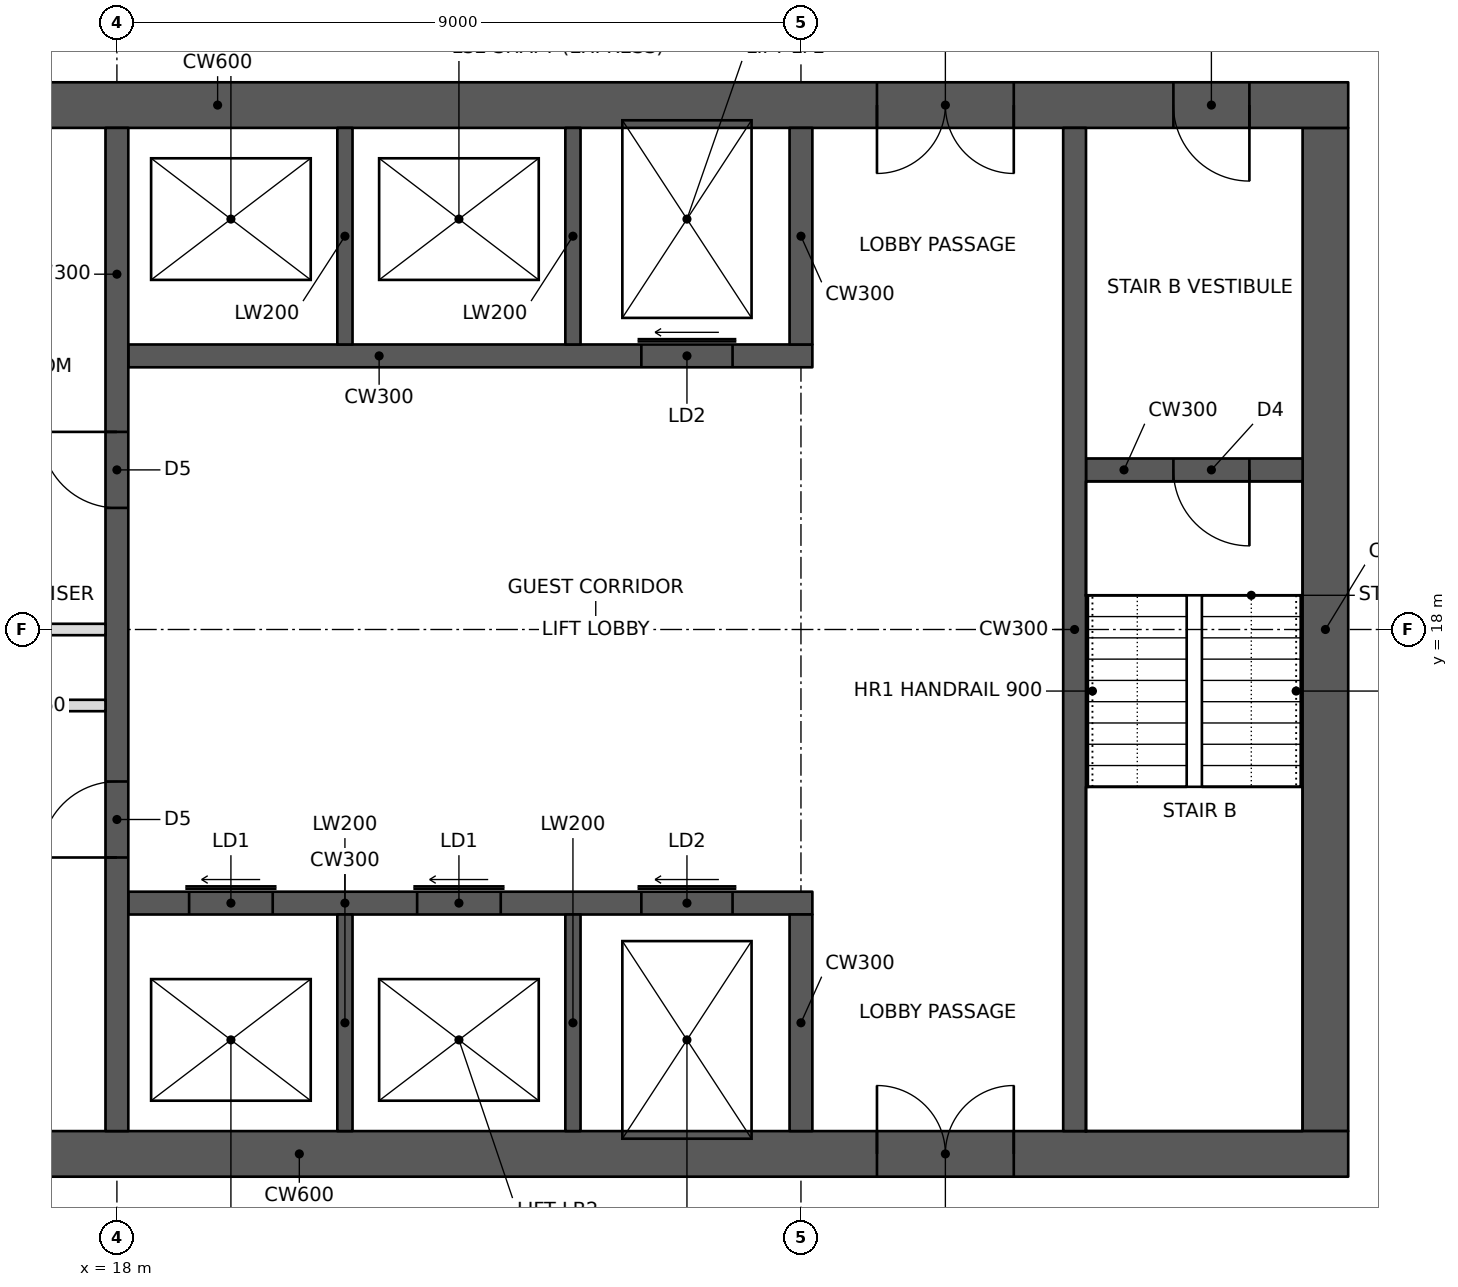
"""IFC4 building model, lengths in metres.
Left out: names, types, materials, properties, quantities, classifications, styles, units other than length and angle.
Written with IfcOpenShell. Run it as: python <this file> out.ifc"""

import sys

from ifc_helpers import new_model, si_unit, direction, frame, frame_2d, origin, place, context, subcontext, project, spatial, rectangle, extrude, element, fill, save


model = new_model("IFC4")
c1 = context("Model", 3, precision=1e-05, world=origin(), true_north=direction((0.0, 1.0)))
c2 = subcontext(c1, "Body", "Model", "MODEL_VIEW")
j1 = project(units=[si_unit("LENGTHUNIT", "METRE"), si_unit("PLANEANGLEUNIT", "RADIAN")], contexts=[c1])
p1 = place(None, origin())
s1 = spatial("IfcSite", under=j1, at=p1, CompositionType="ELEMENT")
p2 = place(p1, origin())
s2 = spatial("IfcBuilding", under=s1, at=p2, CompositionType="ELEMENT")
p3 = place(p2, frame((0.0, 0.0, 97.6)))
s3 = spatial("IfcBuildingStorey", under=s2, at=p3, CompositionType="ELEMENT", Elevation=97.6)
p4 = place(p3, frame((10.8, 11.1, 0.0), z_axis=(0.0, 0.0, 1.0), x_axis=(1.0, 0.0, 0.0)))
e1 = element("IfcWall", 1, at=p4, inside=s3, PredefinedType="SHEAR", context=c2, shape_type="SweptSolid", body=[
    extrude(rectangle(XDim=23.4, YDim=0.6, at=frame_2d((11.7, 0.0))), origin(), (0.0, 0.0, 1.0), 3.4),
])
p5 = place(p4, frame((1.0, 0.0, 0.0)))
e2 = element("IfcOpeningElement", 2, at=p5, cuts=e1, PredefinedType="OPENING", context=c2, shape_type="SweptSolid", body=[
    extrude(rectangle(XDim=1.0, YDim=2.1, at=frame_2d((0.5, 1.05))), frame((0.0, 0.31, 0.0), z_axis=(0.0, -1.0, 0.0), x_axis=(1.0, 0.0, 0.0)), (0.0, 0.0, 1.0), 0.62),
])
p6 = place(p4, frame((17.2, 0.0, 0.0)))
e3 = element("IfcOpeningElement", 3, at=p6, cuts=e1, PredefinedType="OPENING", context=c2, shape_type="SweptSolid", body=[
    extrude(rectangle(XDim=1.8, YDim=2.1, at=frame_2d((0.9, 1.05))), frame((0.0, 0.31, 0.0), z_axis=(0.0, -1.0, 0.0), x_axis=(1.0, 0.0, 0.0)), (0.0, 0.0, 1.0), 0.62),
])
p7 = place(p3, frame((10.8, 24.9, 0.0), z_axis=(0.0, 0.0, 1.0), x_axis=(1.0, 0.0, 0.0)))
e4 = element("IfcWall", 4, at=p7, inside=s3, PredefinedType="SHEAR", context=c2, shape_type="SweptSolid", body=[
    extrude(rectangle(XDim=23.4, YDim=0.6, at=frame_2d((11.7, 0.0))), origin(), (0.0, 0.0, 1.0), 3.4),
])
p8 = place(p7, frame((17.2, 0.0, 0.0)))
e5 = element("IfcOpeningElement", 5, at=p8, cuts=e4, PredefinedType="OPENING", context=c2, shape_type="SweptSolid", body=[
    extrude(rectangle(XDim=1.8, YDim=2.1, at=frame_2d((0.9, 1.05))), frame((0.0, 0.31, 0.0), z_axis=(0.0, -1.0, 0.0), x_axis=(1.0, 0.0, 0.0)), (0.0, 0.0, 1.0), 0.62),
])
p9 = place(p7, frame((21.1, 0.0, 0.0)))
e6 = element("IfcOpeningElement", 6, at=p9, cuts=e4, PredefinedType="OPENING", context=c2, shape_type="SweptSolid", body=[
    extrude(rectangle(XDim=1.0, YDim=2.1, at=frame_2d((0.5, 1.05))), frame((0.0, 0.31, 0.0), z_axis=(0.0, -1.0, 0.0), x_axis=(1.0, 0.0, 0.0)), (0.0, 0.0, 1.0), 0.62),
])
p10 = place(p3, frame((33.9, 11.4, 0.0), z_axis=(0.0, 0.0, 1.0), x_axis=(0.0, 1.0, 0.0)))
e7 = element("IfcWall", 7, at=p10, inside=s3, PredefinedType="SHEAR", context=c2, shape_type="SweptSolid", body=[
    extrude(rectangle(XDim=13.2, YDim=0.6, at=frame_2d((6.6, 0.0))), origin(), (0.0, 0.0, 1.0), 3.4),
])
p11 = place(p3, frame((18.0, 11.4, 0.0), z_axis=(0.0, 0.0, 1.0), x_axis=(0.0, 1.0, 0.0)))
e8 = element("IfcWall", 8, at=p11, inside=s3, PredefinedType="SHEAR", context=c2, shape_type="SweptSolid", body=[
    extrude(rectangle(XDim=13.2, YDim=0.3, at=frame_2d((6.6, 0.0))), origin(), (0.0, 0.0, 1.0), 3.4),
])
p12 = place(p11, frame((3.6, 0.0, 0.0)))
e9 = element("IfcOpeningElement", 9, at=p12, cuts=e8, PredefinedType="OPENING", context=c2, shape_type="SweptSolid", body=[
    extrude(rectangle(XDim=1.0, YDim=2.1, at=frame_2d((0.5, 1.05))), frame((0.0, 0.16, 0.0), z_axis=(0.0, -1.0, 0.0), x_axis=(1.0, 0.0, 0.0)), (0.0, 0.0, 1.0), 0.32),
])
p13 = place(p11, frame((8.2, 0.0, 0.0)))
e10 = element("IfcOpeningElement", 10, at=p13, cuts=e8, PredefinedType="OPENING", context=c2, shape_type="SweptSolid", body=[
    extrude(rectangle(XDim=1.0, YDim=2.1, at=frame_2d((0.5, 1.05))), frame((0.0, 0.16, 0.0), z_axis=(0.0, -1.0, 0.0), x_axis=(1.0, 0.0, 0.0)), (0.0, 0.0, 1.0), 0.32),
])
p14 = place(p3, frame((14.55, 18.0, 0.0), z_axis=(0.0, 0.0, 1.0), x_axis=(1.0, 0.0, 0.0)))
e11 = element("IfcWall", 11, at=p14, inside=s3, PredefinedType="PARTITIONING", context=c2, shape_type="SweptSolid", body=[
    extrude(rectangle(XDim=3.3, YDim=0.15, at=frame_2d((1.65, 0.0))), origin(), (0.0, 0.0, 1.0), 3.2),
])
p15 = place(p3, frame((18.15, 14.4, 0.0), z_axis=(0.0, 0.0, 1.0), x_axis=(1.0, 0.0, 0.0)))
e12 = element("IfcWall", 12, at=p15, inside=s3, PredefinedType="SHEAR", context=c2, shape_type="SweptSolid", body=[
    extrude(rectangle(XDim=9.0, YDim=0.3, at=frame_2d((4.5, 0.0))), origin(), (0.0, 0.0, 1.0), 3.4),
])
p16 = place(p15, frame((0.8, 0.0, 0.0)))
e13 = element("IfcOpeningElement", 13, at=p16, cuts=e12, PredefinedType="OPENING", context=c2, shape_type="SweptSolid", body=[
    extrude(rectangle(XDim=1.1, YDim=2.1, at=frame_2d((0.55, 1.05))), frame((0.0, 0.16, 0.0), z_axis=(0.0, -1.0, 0.0), x_axis=(1.0, 0.0, 0.0)), (0.0, 0.0, 1.0), 0.32),
])
p17 = place(p15, frame((3.8, 0.0, 0.0)))
e14 = element("IfcOpeningElement", 14, at=p17, cuts=e12, PredefinedType="OPENING", context=c2, shape_type="SweptSolid", body=[
    extrude(rectangle(XDim=1.1, YDim=2.1, at=frame_2d((0.55, 1.05))), frame((0.0, 0.16, 0.0), z_axis=(0.0, -1.0, 0.0), x_axis=(1.0, 0.0, 0.0)), (0.0, 0.0, 1.0), 0.32),
])
p18 = place(p15, frame((6.75, 0.0, 0.0)))
e15 = element("IfcOpeningElement", 15, at=p18, cuts=e12, PredefinedType="OPENING", context=c2, shape_type="SweptSolid", body=[
    extrude(rectangle(XDim=1.2, YDim=2.1, at=frame_2d((0.6, 1.05))), frame((0.0, 0.16, 0.0), z_axis=(0.0, -1.0, 0.0), x_axis=(1.0, 0.0, 0.0)), (0.0, 0.0, 1.0), 0.32),
])
p19 = place(p3, frame((27.0, 11.4, 0.0), z_axis=(0.0, 0.0, 1.0), x_axis=(0.0, 1.0, 0.0)))
e16 = element("IfcWall", 16, at=p19, inside=s3, PredefinedType="SHEAR", context=c2, shape_type="SweptSolid", body=[
    extrude(rectangle(XDim=2.85, YDim=0.3, at=frame_2d((1.425, 0.0))), origin(), (0.0, 0.0, 1.0), 3.4),
])
for number, where, z_axis, x_axis in (
    (17, (21.0, 11.4, 0.0), (0.0, 0.0, 1.0), (0.0, 1.0, 0.0)),
    (18, (24.0, 11.4, 0.0), (0.0, 0.0, 1.0), (0.0, 1.0, 0.0)),
):
    element("IfcWall", number, at=place(p3, frame(where, z_axis=z_axis, x_axis=x_axis)), inside=s3, PredefinedType="SHEAR", context=c2, shape_type="SweptSolid", body=[
        extrude(rectangle(XDim=2.85, YDim=0.2, at=frame_2d((1.425, 0.0))), origin(), (0.0, 0.0, 1.0), 3.4),
    ])
p20 = place(p3, frame((18.15, 21.6, 0.0), z_axis=(0.0, 0.0, 1.0), x_axis=(1.0, 0.0, 0.0)))
e19 = element("IfcWall", 19, at=p20, inside=s3, PredefinedType="SHEAR", context=c2, shape_type="SweptSolid", body=[
    extrude(rectangle(XDim=9.0, YDim=0.3, at=frame_2d((4.5, 0.0))), origin(), (0.0, 0.0, 1.0), 3.4),
])
p21 = place(p20, frame((6.75, 0.0, 0.0)))
e20 = element("IfcOpeningElement", 20, at=p21, cuts=e19, PredefinedType="OPENING", context=c2, shape_type="SweptSolid", body=[
    extrude(rectangle(XDim=1.2, YDim=2.1, at=frame_2d((0.6, 1.05))), frame((0.0, 0.16, 0.0), z_axis=(0.0, -1.0, 0.0), x_axis=(1.0, 0.0, 0.0)), (0.0, 0.0, 1.0), 0.32),
])
p22 = place(p3, frame((27.0, 21.75, 0.0), z_axis=(0.0, 0.0, 1.0), x_axis=(0.0, 1.0, 0.0)))
e21 = element("IfcWall", 21, at=p22, inside=s3, PredefinedType="SHEAR", context=c2, shape_type="SweptSolid", body=[
    extrude(rectangle(XDim=2.85, YDim=0.3, at=frame_2d((1.425, 0.0))), origin(), (0.0, 0.0, 1.0), 3.4),
])
for number, where, z_axis, x_axis in (
    (22, (21.0, 21.75, 0.0), (0.0, 0.0, 1.0), (0.0, 1.0, 0.0)),
    (23, (24.0, 21.75, 0.0), (0.0, 0.0, 1.0), (0.0, 1.0, 0.0)),
):
    element("IfcWall", number, at=place(p3, frame(where, z_axis=z_axis, x_axis=x_axis)), inside=s3, PredefinedType="SHEAR", context=c2, shape_type="SweptSolid", body=[
        extrude(rectangle(XDim=2.85, YDim=0.2, at=frame_2d((1.425, 0.0))), origin(), (0.0, 0.0, 1.0), 3.4),
    ])
p23 = place(p3, frame((30.6, 11.4, 0.0), z_axis=(0.0, 0.0, 1.0), x_axis=(0.0, 1.0, 0.0)))
e24 = element("IfcWall", 24, at=p23, inside=s3, PredefinedType="SHEAR", context=c2, shape_type="SweptSolid", body=[
    extrude(rectangle(XDim=13.2, YDim=0.3, at=frame_2d((6.6, 0.0))), origin(), (0.0, 0.0, 1.0), 3.4),
])
p24 = place(p3, frame((30.75, 20.1, 0.0), z_axis=(0.0, 0.0, 1.0), x_axis=(1.0, 0.0, 0.0)))
e25 = element("IfcWall", 25, at=p24, inside=s3, PredefinedType="SHEAR", context=c2, shape_type="SweptSolid", body=[
    extrude(rectangle(XDim=2.85, YDim=0.3, at=frame_2d((1.425, 0.0))), origin(), (0.0, 0.0, 1.0), 3.4),
])
p25 = place(p24, frame((1.15, 0.0, 0.0)))
e26 = element("IfcOpeningElement", 26, at=p25, cuts=e25, PredefinedType="OPENING", context=c2, shape_type="SweptSolid", body=[
    extrude(rectangle(XDim=1.0, YDim=2.1, at=frame_2d((0.5, 1.05))), frame((0.0, 0.16, 0.0), z_axis=(0.0, -1.0, 0.0), x_axis=(1.0, 0.0, 0.0)), (0.0, 0.0, 1.0), 0.32),
])
p26 = place(p3, frame((14.55, 17.0, 0.0), z_axis=(0.0, 0.0, 1.0), x_axis=(1.0, 0.0, 0.0)))
e27 = element("IfcWall", 27, at=p26, inside=s3, PredefinedType="PARTITIONING", context=c2, shape_type="SweptSolid", body=[
    extrude(rectangle(XDim=3.3, YDim=0.15, at=frame_2d((1.65, 0.0))), origin(), (0.0, 0.0, 1.0), 3.2),
])
p27 = place(p26, frame((0.3, 0.0, 0.0)))
e28 = element("IfcOpeningElement", 28, at=p27, cuts=e27, PredefinedType="OPENING", context=c2, shape_type="SweptSolid", body=[
    extrude(rectangle(XDim=1.0, YDim=2.1, at=frame_2d((0.5, 1.05))), frame((0.0, 0.085, 0.0), z_axis=(0.0, -1.0, 0.0), x_axis=(1.0, 0.0, 0.0)), (0.0, 0.0, 1.0), 0.17),
])
p28 = place(p6, origin())
e29 = element("IfcDoor", 29, at=p28, inside=s3, OperationType="DOUBLE_DOOR_SINGLE_SWING", PredefinedType="DOOR", context=c2, shape_type="SweptSolid", body=[
    extrude(rectangle(XDim=1.8, YDim=2.1, at=frame_2d((0.9, 1.05))), frame((0.0, 0.025, 0.0), z_axis=(0.0, -1.0, 0.0), x_axis=(1.0, 0.0, 0.0)), (0.0, 0.0, 1.0), 0.05),
])
fill(e3, e29)
p29 = place(p8, frame((1.8, 0.0, 0.0), z_axis=(0.0, 0.0, 1.0), x_axis=(-1.0, 0.0, 0.0)))
e30 = element("IfcDoor", 30, at=p29, inside=s3, OperationType="DOUBLE_DOOR_SINGLE_SWING", PredefinedType="DOOR", context=c2, shape_type="SweptSolid", body=[
    extrude(rectangle(XDim=1.8, YDim=2.1, at=frame_2d((0.9, 1.05))), frame((0.0, 0.025, 0.0), z_axis=(0.0, -1.0, 0.0), x_axis=(1.0, 0.0, 0.0)), (0.0, 0.0, 1.0), 0.05),
])
fill(e5, e30)
p30 = place(p9, frame((1.0, 0.0, 0.0), z_axis=(0.0, 0.0, 1.0), x_axis=(-1.0, 0.0, 0.0)))
e31 = element("IfcDoor", 31, at=p30, inside=s3, OperationType="SINGLE_SWING_LEFT", PredefinedType="DOOR", context=c2, shape_type="SweptSolid", body=[
    extrude(rectangle(XDim=1.0, YDim=2.1, at=frame_2d((0.5, 1.05))), frame((0.0, 0.025, 0.0), z_axis=(0.0, -1.0, 0.0), x_axis=(1.0, 0.0, 0.0)), (0.0, 0.0, 1.0), 0.05),
])
fill(e6, e31)
p31 = place(p25, frame((1.0, 0.0, 0.0), z_axis=(0.0, 0.0, 1.0), x_axis=(-1.0, 0.0, 0.0)))
e32 = element("IfcDoor", 32, at=p31, inside=s3, OperationType="SINGLE_SWING_LEFT", PredefinedType="DOOR", context=c2, shape_type="SweptSolid", body=[
    extrude(rectangle(XDim=1.0, YDim=2.1, at=frame_2d((0.5, 1.05))), frame((0.0, 0.025, 0.0), z_axis=(0.0, -1.0, 0.0), x_axis=(1.0, 0.0, 0.0)), (0.0, 0.0, 1.0), 0.05),
])
fill(e26, e32)
p32 = place(p12, origin())
e33 = element("IfcDoor", 33, at=p32, inside=s3, OperationType="SINGLE_SWING_LEFT", PredefinedType="DOOR", context=c2, shape_type="SweptSolid", body=[
    extrude(rectangle(XDim=1.0, YDim=2.1, at=frame_2d((0.5, 1.05))), frame((0.0, 0.025, 0.0), z_axis=(0.0, -1.0, 0.0), x_axis=(1.0, 0.0, 0.0)), (0.0, 0.0, 1.0), 0.05),
])
fill(e9, e33)
p33 = place(p13, origin())
e34 = element("IfcDoor", 34, at=p33, inside=s3, OperationType="SINGLE_SWING_RIGHT", PredefinedType="DOOR", context=c2, shape_type="SweptSolid", body=[
    extrude(rectangle(XDim=1.0, YDim=2.1, at=frame_2d((0.5, 1.05))), frame((0.0, 0.025, 0.0), z_axis=(0.0, -1.0, 0.0), x_axis=(1.0, 0.0, 0.0)), (0.0, 0.0, 1.0), 0.05),
])
fill(e10, e34)
p34 = place(p16, origin())
e35 = element("IfcDoor", 35, at=p34, inside=s3, OperationType="SLIDING_TO_LEFT", PredefinedType="DOOR", context=c2, shape_type="SweptSolid", body=[
    extrude(rectangle(XDim=1.1, YDim=2.1, at=frame_2d((0.55, 1.05))), frame((0.0, 0.025, 0.0), z_axis=(0.0, -1.0, 0.0), x_axis=(1.0, 0.0, 0.0)), (0.0, 0.0, 1.0), 0.05),
])
fill(e13, e35)
p35 = place(p17, origin())
e36 = element("IfcDoor", 36, at=p35, inside=s3, OperationType="SLIDING_TO_LEFT", PredefinedType="DOOR", context=c2, shape_type="SweptSolid", body=[
    extrude(rectangle(XDim=1.1, YDim=2.1, at=frame_2d((0.55, 1.05))), frame((0.0, 0.025, 0.0), z_axis=(0.0, -1.0, 0.0), x_axis=(1.0, 0.0, 0.0)), (0.0, 0.0, 1.0), 0.05),
])
fill(e14, e36)
p36 = place(p18, origin())
e37 = element("IfcDoor", 37, at=p36, inside=s3, OperationType="SLIDING_TO_LEFT", PredefinedType="DOOR", context=c2, shape_type="SweptSolid", body=[
    extrude(rectangle(XDim=1.2, YDim=2.1, at=frame_2d((0.6, 1.05))), frame((0.0, 0.025, 0.0), z_axis=(0.0, -1.0, 0.0), x_axis=(1.0, 0.0, 0.0)), (0.0, 0.0, 1.0), 0.05),
])
fill(e15, e37)
p37 = place(p21, origin())
e38 = element("IfcDoor", 38, at=p37, inside=s3, OperationType="SLIDING_TO_LEFT", PredefinedType="DOOR", context=c2, shape_type="SweptSolid", body=[
    extrude(rectangle(XDim=1.2, YDim=2.1, at=frame_2d((0.6, 1.05))), frame((0.0, 0.025, 0.0), z_axis=(0.0, -1.0, 0.0), x_axis=(1.0, 0.0, 0.0)), (0.0, 0.0, 1.0), 0.05),
])
fill(e20, e38)
save(model, sys.argv[1])
